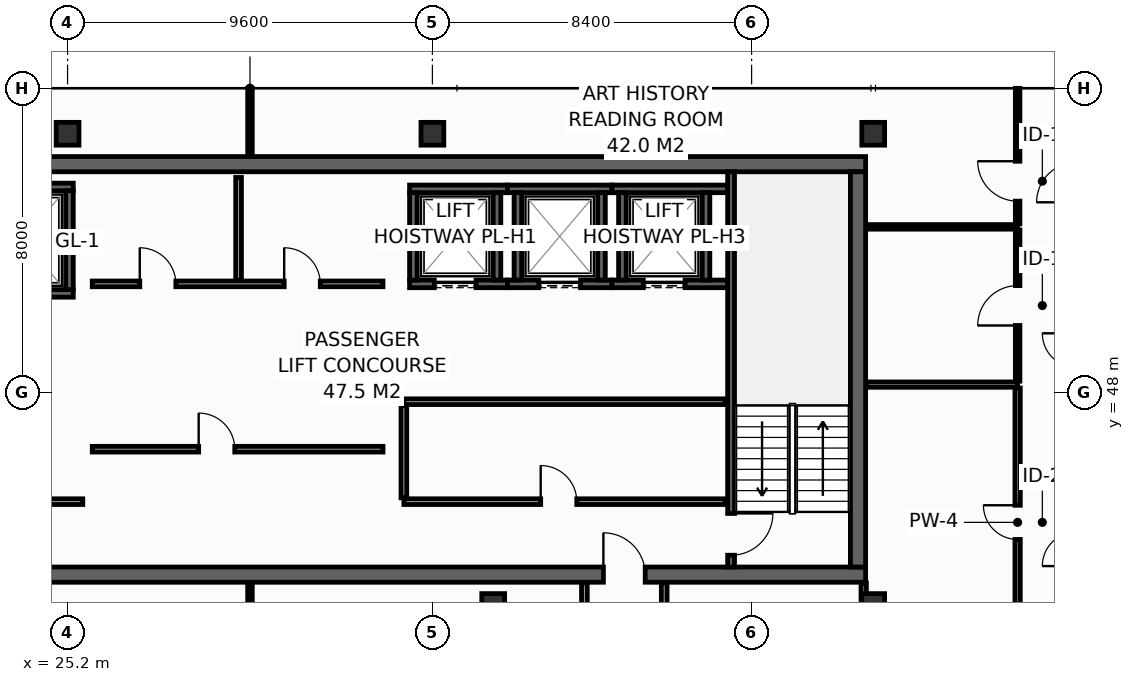
"""IFC4 building model, lengths in metres.
Left out: names, types, materials, properties, quantities, classifications, styles, units other than length and angle.
Written with IfcOpenShell. Run it as: python <this file> out.ifc"""

import sys

from ifc_helpers import new_model, si_unit, direction, frame, frame_2d, origin, origin_2d, place, context, subcontext, project, spatial, rectangle, hollow_rectangle, extrude, element, fill, save


model = new_model("IFC4")
c1 = context("Model", 3, precision=1e-05, world=origin(), true_north=direction((0.0, 1.0)))
c2 = subcontext(c1, "Body", "Model", "MODEL_VIEW")
j1 = project(units=[si_unit("LENGTHUNIT", "METRE"), si_unit("PLANEANGLEUNIT", "RADIAN")], contexts=[c1])
p1 = place(None, origin())
s1 = spatial("IfcSite", under=j1, at=p1, CompositionType="ELEMENT")
p2 = place(p1, origin())
s2 = spatial("IfcBuilding", under=s1, at=p2, CompositionType="ELEMENT")
p3 = place(p2, frame((0.0, 0.0, 276.2)))
s3 = spatial("IfcBuildingStorey", under=s2, at=p3, CompositionType="ELEMENT", Elevation=276.2)
p4 = place(p3, frame((13.7, 43.2, 0.0), z_axis=(0.0, 0.0, 1.0), x_axis=(1.0, 0.0, 0.0)))
e1 = element("IfcWall", 1, at=p4, inside=s3, PredefinedType="SHEAR", context=c2, shape_type="SweptSolid", body=[
    extrude(rectangle(XDim=32.5, YDim=0.4, at=frame_2d((16.25, 0.0))), origin(), (0.0, 0.0, 1.0), 3.55),
])
p5 = place(p4, frame((5.4, 0.0, 0.0)))
e2 = element("IfcOpeningElement", 2, at=p5, cuts=e1, PredefinedType="OPENING", context=c2, shape_type="SweptSolid", body=[
    extrude(rectangle(XDim=1.1, YDim=2.15, at=frame_2d((0.55, 1.075))), frame((0.0, 0.21, 0.0), z_axis=(0.0, -1.0, 0.0), x_axis=(1.0, 0.0, 0.0)), (0.0, 0.0, 1.0), 0.42),
])
p6 = place(p4, frame((25.6, 0.0, 0.0)))
e3 = element("IfcOpeningElement", 3, at=p6, cuts=e1, PredefinedType="OPENING", context=c2, shape_type="SweptSolid", body=[
    extrude(rectangle(XDim=1.1, YDim=2.15, at=frame_2d((0.55, 1.075))), frame((0.0, 0.21, 0.0), z_axis=(0.0, -1.0, 0.0), x_axis=(1.0, 0.0, 0.0)), (0.0, 0.0, 1.0), 0.42),
])
p7 = place(p3, frame((13.7, 54.0, 0.0), z_axis=(0.0, 0.0, 1.0), x_axis=(1.0, 0.0, 0.0)))
e4 = element("IfcWall", 4, at=p7, inside=s3, PredefinedType="SHEAR", context=c2, shape_type="SweptSolid", body=[
    extrude(rectangle(XDim=32.5, YDim=0.4, at=frame_2d((16.25, 0.0))), origin(), (0.0, 0.0, 1.0), 3.55),
])
p8 = place(p3, frame((46.0, 43.4, 0.0), z_axis=(0.0, 0.0, 1.0), x_axis=(0.0, 1.0, 0.0)))
e5 = element("IfcWall", 5, at=p8, inside=s3, PredefinedType="SHEAR", context=c2, shape_type="SweptSolid", body=[
    extrude(rectangle(XDim=10.4, YDim=0.4, at=frame_2d((5.2, 0.0))), origin(), (0.0, 0.0, 1.0), 3.55),
])
for number, where, z_axis, x_axis in (
    (6, (25.2, 54.8, 0.0), (0.0, 0.0, 1.0), (1.0, 0.0, 0.0)),
    (7, (34.8, 54.8, 0.0), (0.0, 0.0, 1.0), (1.0, 0.0, 0.0)),
    (8, (46.4, 54.8, 0.0), (0.0, 0.0, 1.0), (1.0, 0.0, 0.0)),
    (9, (36.4, 42.4, 0.0), (0.0, 0.0, 1.0), (1.0, 0.0, 0.0)),
    (10, (46.4, 42.4, 0.0), (0.0, 0.0, 1.0), (1.0, 0.0, 0.0)),
):
    element("IfcColumn", number, at=place(p3, frame(where, z_axis=z_axis, x_axis=x_axis)), inside=s3, PredefinedType="COLUMN", context=c2, shape_type="SweptSolid", body=[
        extrude(hollow_rectangle(XDim=0.6, YDim=0.6, WallThickness=0.028, at=origin_2d()), origin(), (0.0, 0.0, 1.0), 3.8),
    ])
p9 = place(p3, frame((22.5, 50.6, 0.0), z_axis=(0.0, 0.0, 1.0), x_axis=(1.0, 0.0, 0.0)))
e11 = element("IfcWall", 11, at=p9, inside=s3, PredefinedType="SHEAR", context=c2, shape_type="SweptSolid", body=[
    extrude(rectangle(XDim=2.85, YDim=0.2, at=frame_2d((1.425, 0.0))), origin(), (0.0, 0.0, 1.0), 3.55),
])
p10 = place(p9, frame((0.925, 0.0, 0.0)))
e12 = element("IfcOpeningElement", 12, at=p10, cuts=e11, PredefinedType="OPENING", context=c2, shape_type="SweptSolid", body=[
    extrude(rectangle(XDim=1.25, YDim=2.3, at=frame_2d((0.625, 1.15))), frame((0.0, 0.11, 0.0), z_axis=(0.0, -1.0, 0.0), x_axis=(1.0, 0.0, 0.0)), (0.0, 0.0, 1.0), 0.22),
])
p11 = place(p3, frame((22.5, 53.4, 0.0), z_axis=(0.0, 0.0, 1.0), x_axis=(1.0, 0.0, 0.0)))
e13 = element("IfcWall", 13, at=p11, inside=s3, PredefinedType="SHEAR", context=c2, shape_type="SweptSolid", body=[
    extrude(rectangle(XDim=2.85, YDim=0.2, at=frame_2d((1.425, 0.0))), origin(), (0.0, 0.0, 1.0), 3.55),
])
p12 = place(p3, frame((25.25, 50.7, 0.0), z_axis=(0.0, 0.0, 1.0), x_axis=(0.0, 1.0, 0.0)))
e14 = element("IfcWall", 14, at=p12, inside=s3, PredefinedType="SHEAR", context=c2, shape_type="SweptSolid", body=[
    extrude(rectangle(XDim=2.6, YDim=0.2, at=frame_2d((1.3, 0.0))), origin(), (0.0, 0.0, 1.0), 3.55),
])
p13 = place(p3, frame((34.2, 50.85, 0.0), z_axis=(0.0, 0.0, 1.0), x_axis=(1.0, 0.0, 0.0)))
e15 = element("IfcWall", 15, at=p13, inside=s3, PredefinedType="SHEAR", context=c2, shape_type="SweptSolid", body=[
    extrude(rectangle(XDim=2.575, YDim=0.2, at=frame_2d((1.288, 0.0))), origin(), (0.0, 0.0, 1.0), 3.55),
])
p14 = place(p13, frame((0.65, 0.0, 0.0)))
e16 = element("IfcOpeningElement", 16, at=p14, cuts=e15, PredefinedType="OPENING", context=c2, shape_type="SweptSolid", body=[
    extrude(rectangle(XDim=1.1, YDim=2.2, at=frame_2d((0.55, 1.1))), frame((0.0, 0.11, 0.0), z_axis=(0.0, -1.0, 0.0), x_axis=(1.0, 0.0, 0.0)), (0.0, 0.0, 1.0), 0.22),
])
p15 = place(p3, frame((34.2, 53.35, 0.0), z_axis=(0.0, 0.0, 1.0), x_axis=(1.0, 0.0, 0.0)))
e17 = element("IfcWall", 17, at=p15, inside=s3, PredefinedType="SHEAR", context=c2, shape_type="SweptSolid", body=[
    extrude(rectangle(XDim=2.575, YDim=0.2, at=frame_2d((1.288, 0.0))), origin(), (0.0, 0.0, 1.0), 3.55),
])
for number, where, z_axis, x_axis in (
    (18, (34.3, 50.95, 0.0), (0.0, 0.0, 1.0), (0.0, 1.0, 0.0)),
    (19, (36.5, 50.95, 0.0), (0.0, 0.0, 1.0), (0.0, 1.0, 0.0)),
):
    element("IfcWall", number, at=place(p3, frame(where, z_axis=z_axis, x_axis=x_axis)), inside=s3, PredefinedType="SHEAR", context=c2, shape_type="SweptSolid", body=[
        extrude(rectangle(XDim=2.3, YDim=0.2, at=frame_2d((1.15, 0.0))), origin(), (0.0, 0.0, 1.0), 3.55),
    ])
p16 = place(p3, frame((36.775, 50.85, 0.0), z_axis=(0.0, 0.0, 1.0), x_axis=(1.0, 0.0, 0.0)))
e20 = element("IfcWall", 20, at=p16, inside=s3, PredefinedType="SHEAR", context=c2, shape_type="SweptSolid", body=[
    extrude(rectangle(XDim=2.75, YDim=0.2, at=frame_2d((1.375, 0.0))), origin(), (0.0, 0.0, 1.0), 3.55),
])
p17 = place(p16, frame((0.825, 0.0, 0.0)))
e21 = element("IfcOpeningElement", 21, at=p17, cuts=e20, PredefinedType="OPENING", context=c2, shape_type="SweptSolid", body=[
    extrude(rectangle(XDim=1.1, YDim=2.2, at=frame_2d((0.55, 1.1))), frame((0.0, 0.11, 0.0), z_axis=(0.0, -1.0, 0.0), x_axis=(1.0, 0.0, 0.0)), (0.0, 0.0, 1.0), 0.22),
])
p18 = place(p3, frame((36.775, 53.35, 0.0), z_axis=(0.0, 0.0, 1.0), x_axis=(1.0, 0.0, 0.0)))
e22 = element("IfcWall", 22, at=p18, inside=s3, PredefinedType="SHEAR", context=c2, shape_type="SweptSolid", body=[
    extrude(rectangle(XDim=2.75, YDim=0.2, at=frame_2d((1.375, 0.0))), origin(), (0.0, 0.0, 1.0), 3.55),
])
for number, where, z_axis, x_axis in (
    (23, (37.05, 50.95, 0.0), (0.0, 0.0, 1.0), (0.0, 1.0, 0.0)),
    (24, (39.25, 50.95, 0.0), (0.0, 0.0, 1.0), (0.0, 1.0, 0.0)),
):
    element("IfcWall", number, at=place(p3, frame(where, z_axis=z_axis, x_axis=x_axis)), inside=s3, PredefinedType="SHEAR", context=c2, shape_type="SweptSolid", body=[
        extrude(rectangle(XDim=2.3, YDim=0.2, at=frame_2d((1.15, 0.0))), origin(), (0.0, 0.0, 1.0), 3.55),
    ])
p19 = place(p3, frame((39.525, 50.85, 0.0), z_axis=(0.0, 0.0, 1.0), x_axis=(1.0, 0.0, 0.0)))
e25 = element("IfcWall", 25, at=p19, inside=s3, PredefinedType="SHEAR", context=c2, shape_type="SweptSolid", body=[
    extrude(rectangle(XDim=3.045, YDim=0.2, at=frame_2d((1.522, 0.0))), origin(), (0.0, 0.0, 1.0), 3.55),
])
p20 = place(p19, frame((0.825, 0.0, 0.0)))
e26 = element("IfcOpeningElement", 26, at=p20, cuts=e25, PredefinedType="OPENING", context=c2, shape_type="SweptSolid", body=[
    extrude(rectangle(XDim=1.1, YDim=2.2, at=frame_2d((0.55, 1.1))), frame((0.0, 0.11, 0.0), z_axis=(0.0, -1.0, 0.0), x_axis=(1.0, 0.0, 0.0)), (0.0, 0.0, 1.0), 0.22),
])
p21 = place(p3, frame((39.525, 53.35, 0.0), z_axis=(0.0, 0.0, 1.0), x_axis=(1.0, 0.0, 0.0)))
e27 = element("IfcWall", 27, at=p21, inside=s3, PredefinedType="SHEAR", context=c2, shape_type="SweptSolid", body=[
    extrude(rectangle(XDim=3.045, YDim=0.2, at=frame_2d((1.522, 0.0))), origin(), (0.0, 0.0, 1.0), 3.55),
])
for number, where, z_axis, x_axis in (
    (28, (39.8, 50.95, 0.0), (0.0, 0.0, 1.0), (0.0, 1.0, 0.0)),
    (29, (42.0, 50.95, 0.0), (0.0, 0.0, 1.0), (0.0, 1.0, 0.0)),
):
    element("IfcWall", number, at=place(p3, frame(where, z_axis=z_axis, x_axis=x_axis)), inside=s3, PredefinedType="SHEAR", context=c2, shape_type="SweptSolid", body=[
        extrude(rectangle(XDim=2.3, YDim=0.2, at=frame_2d((1.15, 0.0))), origin(), (0.0, 0.0, 1.0), 3.55),
    ])
p22 = place(p3, frame((42.66, 53.8, 0.0), z_axis=(0.0, 0.0, 1.0), x_axis=(0.0, -1.0, 0.0)))
e30 = element("IfcWall", 30, at=p22, inside=s3, PredefinedType="SHEAR", context=c2, shape_type="SweptSolid", body=[
    extrude(rectangle(XDim=10.4, YDim=0.18, at=frame_2d((5.2, 0.0))), origin(), (0.0, 0.0, 1.0), 3.55),
])
p23 = place(p22, frame((8.99, 0.0, 0.0)))
e31 = element("IfcOpeningElement", 31, at=p23, cuts=e30, PredefinedType="OPENING", context=c2, shape_type="SweptSolid", body=[
    extrude(rectangle(XDim=1.1, YDim=2.15, at=frame_2d((0.55, 1.075))), frame((0.0, 0.1, 0.0), z_axis=(0.0, -1.0, 0.0), x_axis=(1.0, 0.0, 0.0)), (0.0, 0.0, 1.0), 0.2),
])
p24 = place(p3, frame((22.68, 45.12, 0.0), z_axis=(0.0, 0.0, 1.0), x_axis=(1.0, 0.0, 0.0)))
e32 = element("IfcWall", 32, at=p24, inside=s3, PredefinedType="PARTITIONING", context=c2, shape_type="SweptSolid", body=[
    extrude(rectangle(XDim=2.92, YDim=0.15, at=frame_2d((1.46, 0.0))), origin(), (0.0, 0.0, 1.0), 3.55),
])
p25 = place(p24, frame((0.85, 0.0, 0.0)))
e33 = element("IfcOpeningElement", 33, at=p25, cuts=e32, PredefinedType="OPENING", context=c2, shape_type="SweptSolid", body=[
    extrude(rectangle(XDim=1.1, YDim=2.15, at=frame_2d((0.55, 1.075))), frame((0.0, 0.085, 0.0), z_axis=(0.0, -1.0, 0.0), x_axis=(1.0, 0.0, 0.0)), (0.0, 0.0, 1.0), 0.17),
])
p26 = place(p3, frame((34.05, 45.12, 0.0), z_axis=(0.0, 0.0, 1.0), x_axis=(1.0, 0.0, 0.0)))
e34 = element("IfcWall", 34, at=p26, inside=s3, PredefinedType="PARTITIONING", context=c2, shape_type="SweptSolid", body=[
    extrude(rectangle(XDim=8.45, YDim=0.15, at=frame_2d((4.225, 0.0))), origin(), (0.0, 0.0, 1.0), 3.55),
])
p27 = place(p26, frame((3.6, 0.0, 0.0)))
e35 = element("IfcOpeningElement", 35, at=p27, cuts=e34, PredefinedType="OPENING", context=c2, shape_type="SweptSolid", body=[
    extrude(rectangle(XDim=0.95, YDim=2.15, at=frame_2d((0.475, 1.075))), frame((0.0, 0.085, 0.0), z_axis=(0.0, -1.0, 0.0), x_axis=(1.0, 0.0, 0.0)), (0.0, 0.0, 1.0), 0.17),
])
p28 = place(p3, frame((34.05, 47.75, 0.0), z_axis=(0.0, 0.0, 1.0), x_axis=(1.0, 0.0, 0.0)))
e36 = element("IfcWall", 36, at=p28, inside=s3, PredefinedType="PARTITIONING", context=c2, shape_type="SweptSolid", body=[
    extrude(rectangle(XDim=8.45, YDim=0.15, at=frame_2d((4.225, 0.0))), origin(), (0.0, 0.0, 1.0), 3.55),
])
p29 = place(p3, frame((34.05, 45.22, 0.0), z_axis=(0.0, 0.0, 1.0), x_axis=(0.0, 1.0, 0.0)))
e37 = element("IfcWall", 37, at=p29, inside=s3, PredefinedType="PARTITIONING", context=c2, shape_type="SweptSolid", body=[
    extrude(rectangle(XDim=2.43, YDim=0.15, at=frame_2d((1.215, 0.0))), origin(), (0.0, 0.0, 1.0), 3.55),
])
p30 = place(p3, frame((25.85, 50.85, 0.0), z_axis=(0.0, 0.0, 1.0), x_axis=(1.0, 0.0, 0.0)))
e38 = element("IfcWall", 38, at=p30, inside=s3, PredefinedType="PARTITIONING", context=c2, shape_type="SweptSolid", body=[
    extrude(rectangle(XDim=7.65, YDim=0.15, at=frame_2d((3.825, 0.0))), origin(), (0.0, 0.0, 1.0), 3.55),
])
p31 = place(p30, frame((1.25, 0.0, 0.0)))
e39 = element("IfcOpeningElement", 39, at=p31, cuts=e38, PredefinedType="OPENING", context=c2, shape_type="SweptSolid", body=[
    extrude(rectangle(XDim=0.95, YDim=2.15, at=frame_2d((0.475, 1.075))), frame((0.0, 0.085, 0.0), z_axis=(0.0, -1.0, 0.0), x_axis=(1.0, 0.0, 0.0)), (0.0, 0.0, 1.0), 0.17),
])
p32 = place(p30, frame((5.05, 0.0, 0.0)))
e40 = element("IfcOpeningElement", 40, at=p32, cuts=e38, PredefinedType="OPENING", context=c2, shape_type="SweptSolid", body=[
    extrude(rectangle(XDim=0.95, YDim=2.15, at=frame_2d((0.475, 1.075))), frame((0.0, 0.085, 0.0), z_axis=(0.0, -1.0, 0.0), x_axis=(1.0, 0.0, 0.0)), (0.0, 0.0, 1.0), 0.17),
])
p33 = place(p3, frame((29.7, 50.95, 0.0), z_axis=(0.0, 0.0, 1.0), x_axis=(0.0, 1.0, 0.0)))
e41 = element("IfcWall", 41, at=p33, inside=s3, PredefinedType="PARTITIONING", context=c2, shape_type="SweptSolid", body=[
    extrude(rectangle(XDim=2.7, YDim=0.15, at=frame_2d((1.35, 0.0))), origin(), (0.0, 0.0, 1.0), 3.55),
])
p34 = place(p3, frame((25.85, 46.5, 0.0), z_axis=(0.0, 0.0, 1.0), x_axis=(1.0, 0.0, 0.0)))
e42 = element("IfcWall", 42, at=p34, inside=s3, PredefinedType="PARTITIONING", context=c2, shape_type="SweptSolid", body=[
    extrude(rectangle(XDim=7.65, YDim=0.15, at=frame_2d((3.825, 0.0))), origin(), (0.0, 0.0, 1.0), 3.55),
])
p35 = place(p34, frame((2.8, 0.0, 0.0)))
e43 = element("IfcOpeningElement", 43, at=p35, cuts=e42, PredefinedType="OPENING", context=c2, shape_type="SweptSolid", body=[
    extrude(rectangle(XDim=0.95, YDim=2.15, at=frame_2d((0.475, 1.075))), frame((0.0, 0.085, 0.0), z_axis=(0.0, -1.0, 0.0), x_axis=(1.0, 0.0, 0.0)), (0.0, 0.0, 1.0), 0.17),
])
p36 = place(p3, frame((46.15, 41.04, 0.0), z_axis=(0.0, 0.0, 1.0), x_axis=(0.0, 1.0, 0.0)))
e44 = element("IfcWall", 44, at=p36, inside=s3, PredefinedType="PARTITIONING", context=c2, shape_type="SweptSolid", body=[
    extrude(rectangle(XDim=1.94, YDim=0.14, at=frame_2d((0.97, 0.0))), origin(), (0.0, 0.0, 1.0), 3.55),
])
p37 = place(p3, frame((46.22, 48.2, 0.0), z_axis=(0.0, 0.0, 1.0), x_axis=(1.0, 0.0, 0.0)))
e45 = element("IfcWall", 45, at=p37, inside=s3, PredefinedType="PARTITIONING", context=c2, shape_type="SweptSolid", body=[
    extrude(rectangle(XDim=3.98, YDim=0.14, at=frame_2d((1.99, 0.0))), origin(), (0.0, 0.0, 1.0), 3.55),
])
p38 = place(p3, frame((50.2, 41.04, 0.0), z_axis=(0.0, 0.0, 1.0), x_axis=(0.0, 1.0, 0.0)))
e46 = element("IfcWall", 46, at=p38, inside=s3, PredefinedType="PARTITIONING", context=c2, shape_type="SweptSolid", body=[
    extrude(rectangle(XDim=7.07, YDim=0.14, at=frame_2d((3.535, 0.0))), origin(), (0.0, 0.0, 1.0), 2.947),
])
p39 = place(p38, frame((3.085, 0.0, 0.0)))
e47 = element("IfcOpeningElement", 47, at=p39, cuts=e46, PredefinedType="OPENING", context=c2, shape_type="SweptSolid", body=[
    extrude(rectangle(XDim=0.9, YDim=2.1, at=frame_2d((0.45, 1.05))), frame((0.0, 0.08, 0.0), z_axis=(0.0, -1.0, 0.0), x_axis=(1.0, 0.0, 0.0)), (0.0, 0.0, 1.0), 0.16),
])
p40 = place(p3, frame((46.22, 52.35, 0.0), z_axis=(0.0, 0.0, 1.0), x_axis=(1.0, 0.0, 0.0)))
e48 = element("IfcWall", 48, at=p40, inside=s3, PredefinedType="PARTITIONING", context=c2, shape_type="SweptSolid", body=[
    extrude(rectangle(XDim=3.98, YDim=0.12, at=frame_2d((1.99, 0.0))), origin(), (0.0, 0.0, 1.0), 3.55),
])
p41 = place(p3, frame((30.0, 54.22, 0.0), z_axis=(0.0, 0.0, 1.0), x_axis=(0.0, 1.0, 0.0)))
e49 = element("IfcWall", 49, at=p41, inside=s3, PredefinedType="PARTITIONING", context=c2, shape_type="SweptSolid", body=[
    extrude(rectangle(XDim=1.775, YDim=0.12, at=frame_2d((0.888, 0.0))), origin(), (0.0, 0.0, 1.0), 2.935),
])
p42 = place(p3, frame((50.2, 48.29, 0.0), z_axis=(0.0, 0.0, 1.0), x_axis=(0.0, 1.0, 0.0)))
e50 = element("IfcWall", 50, at=p42, inside=s3, PredefinedType="PARTITIONING", context=c2, shape_type="SweptSolid", body=[
    extrude(rectangle(XDim=3.98, YDim=0.12, at=frame_2d((1.99, 0.0))), origin(), (0.0, 0.0, 1.0), 3.55),
])
p43 = place(p42, frame((1.465, 0.0, 0.0)))
e51 = element("IfcOpeningElement", 51, at=p43, cuts=e50, PredefinedType="OPENING", context=c2, shape_type="SweptSolid", body=[
    extrude(rectangle(XDim=1.05, YDim=2.15, at=frame_2d((0.525, 1.075))), frame((0.0, 0.07, 0.0), z_axis=(0.0, -1.0, 0.0), x_axis=(1.0, 0.0, 0.0)), (0.0, 0.0, 1.0), 0.14),
])
p44 = place(p3, frame((50.2, 52.43, 0.0), z_axis=(0.0, 0.0, 1.0), x_axis=(0.0, 1.0, 0.0)))
e52 = element("IfcWall", 52, at=p44, inside=s3, PredefinedType="PARTITIONING", context=c2, shape_type="SweptSolid", body=[
    extrude(rectangle(XDim=3.565, YDim=0.12, at=frame_2d((1.783, 0.0))), origin(), (0.0, 0.0, 1.0), 2.935),
])
p45 = place(p44, frame((0.597, 0.0, 0.0)))
e53 = element("IfcOpeningElement", 53, at=p45, cuts=e52, PredefinedType="OPENING", context=c2, shape_type="SweptSolid", body=[
    extrude(rectangle(XDim=1.05, YDim=2.15, at=frame_2d((0.525, 1.075))), frame((0.0, 0.07, 0.0), z_axis=(0.0, -1.0, 0.0), x_axis=(1.0, 0.0, 0.0)), (0.0, 0.0, 1.0), 0.14),
])
for number, where, z_axis, x_axis in (
    (54, (38.8, 40.95, 0.0), (0.0, 0.0, 1.0), (0.0, 1.0, 0.0)),
    (55, (40.9, 40.95, 0.0), (0.0, 0.0, 1.0), (0.0, 1.0, 0.0)),
):
    element("IfcWall", number, at=place(p3, frame(where, z_axis=z_axis, x_axis=x_axis)), inside=s3, PredefinedType="PARTITIONING", context=c2, shape_type="SweptSolid", body=[
        extrude(rectangle(XDim=2.03, YDim=0.15, at=frame_2d((1.015, 0.0))), origin(), (0.0, 0.0, 1.0), 3.55),
    ])
p46 = place(p3, frame((30.0, 40.95, 0.0), z_axis=(0.0, 0.0, 1.0), x_axis=(0.0, 1.0, 0.0)))
e56 = element("IfcWall", 56, at=p46, inside=s3, PredefinedType="PARTITIONING", context=c2, shape_type="SweptSolid", body=[
    extrude(rectangle(XDim=2.03, YDim=0.12, at=frame_2d((1.015, 0.0))), origin(), (0.0, 0.0, 1.0), 2.947),
])
p47 = place(p14, origin())
e57 = element("IfcDoor", 57, at=p47, inside=s3, OperationType="SLIDING_TO_LEFT", PredefinedType="DOOR", context=c2, shape_type="SweptSolid", body=[
    extrude(rectangle(XDim=1.1, YDim=2.2, at=frame_2d((0.55, 1.1))), frame((0.0, 0.025, 0.0), z_axis=(0.0, -1.0, 0.0), x_axis=(1.0, 0.0, 0.0)), (0.0, 0.0, 1.0), 0.05),
])
fill(e16, e57)
p48 = place(p17, origin())
e58 = element("IfcDoor", 58, at=p48, inside=s3, OperationType="SLIDING_TO_LEFT", PredefinedType="DOOR", context=c2, shape_type="SweptSolid", body=[
    extrude(rectangle(XDim=1.1, YDim=2.2, at=frame_2d((0.55, 1.1))), frame((0.0, 0.025, 0.0), z_axis=(0.0, -1.0, 0.0), x_axis=(1.0, 0.0, 0.0)), (0.0, 0.0, 1.0), 0.05),
])
fill(e21, e58)
p49 = place(p20, origin())
e59 = element("IfcDoor", 59, at=p49, inside=s3, OperationType="SLIDING_TO_LEFT", PredefinedType="DOOR", context=c2, shape_type="SweptSolid", body=[
    extrude(rectangle(XDim=1.1, YDim=2.2, at=frame_2d((0.55, 1.1))), frame((0.0, 0.025, 0.0), z_axis=(0.0, -1.0, 0.0), x_axis=(1.0, 0.0, 0.0)), (0.0, 0.0, 1.0), 0.05),
])
fill(e26, e59)
p50 = place(p23, origin())
e60 = element("IfcDoor", 60, at=p50, inside=s3, OperationType="SINGLE_SWING_LEFT", PredefinedType="DOOR", context=c2, shape_type="SweptSolid", body=[
    extrude(rectangle(XDim=1.1, YDim=2.15, at=frame_2d((0.55, 1.075))), frame((0.0, 0.025, 0.0), z_axis=(0.0, -1.0, 0.0), x_axis=(1.0, 0.0, 0.0)), (0.0, 0.0, 1.0), 0.05),
])
fill(e31, e60)
p51 = place(p6, origin())
e61 = element("IfcDoor", 61, at=p51, inside=s3, OperationType="SINGLE_SWING_LEFT", PredefinedType="DOOR", context=c2, shape_type="SweptSolid", body=[
    extrude(rectangle(XDim=1.1, YDim=2.15, at=frame_2d((0.55, 1.075))), frame((0.0, 0.025, 0.0), z_axis=(0.0, -1.0, 0.0), x_axis=(1.0, 0.0, 0.0)), (0.0, 0.0, 1.0), 0.05),
])
fill(e3, e61)
p52 = place(p27, origin())
e62 = element("IfcDoor", 62, at=p52, inside=s3, OperationType="SINGLE_SWING_LEFT", PredefinedType="DOOR", context=c2, shape_type="SweptSolid", body=[
    extrude(rectangle(XDim=0.95, YDim=2.15, at=frame_2d((0.475, 1.075))), frame((0.0, 0.025, 0.0), z_axis=(0.0, -1.0, 0.0), x_axis=(1.0, 0.0, 0.0)), (0.0, 0.0, 1.0), 0.05),
])
fill(e35, e62)
p53 = place(p31, origin())
e63 = element("IfcDoor", 63, at=p53, inside=s3, OperationType="SINGLE_SWING_LEFT", PredefinedType="DOOR", context=c2, shape_type="SweptSolid", body=[
    extrude(rectangle(XDim=0.95, YDim=2.15, at=frame_2d((0.475, 1.075))), frame((0.0, 0.025, 0.0), z_axis=(0.0, -1.0, 0.0), x_axis=(1.0, 0.0, 0.0)), (0.0, 0.0, 1.0), 0.05),
])
fill(e39, e63)
p54 = place(p32, origin())
e64 = element("IfcDoor", 64, at=p54, inside=s3, OperationType="SINGLE_SWING_LEFT", PredefinedType="DOOR", context=c2, shape_type="SweptSolid", body=[
    extrude(rectangle(XDim=0.95, YDim=2.15, at=frame_2d((0.475, 1.075))), frame((0.0, 0.025, 0.0), z_axis=(0.0, -1.0, 0.0), x_axis=(1.0, 0.0, 0.0)), (0.0, 0.0, 1.0), 0.05),
])
fill(e40, e64)
p55 = place(p35, origin())
e65 = element("IfcDoor", 65, at=p55, inside=s3, OperationType="SINGLE_SWING_LEFT", PredefinedType="DOOR", context=c2, shape_type="SweptSolid", body=[
    extrude(rectangle(XDim=0.95, YDim=2.15, at=frame_2d((0.475, 1.075))), frame((0.0, 0.025, 0.0), z_axis=(0.0, -1.0, 0.0), x_axis=(1.0, 0.0, 0.0)), (0.0, 0.0, 1.0), 0.05),
])
fill(e43, e65)
p56 = place(p39, origin())
e66 = element("IfcDoor", 66, at=p56, inside=s3, OperationType="SINGLE_SWING_RIGHT", PredefinedType="DOOR", context=c2, shape_type="SweptSolid", body=[
    extrude(rectangle(XDim=0.9, YDim=2.1, at=frame_2d((0.45, 1.05))), frame((0.0, 0.025, 0.0), z_axis=(0.0, -1.0, 0.0), x_axis=(1.0, 0.0, 0.0)), (0.0, 0.0, 1.0), 0.05),
])
fill(e47, e66)
p57 = place(p43, origin())
e67 = element("IfcDoor", 67, at=p57, inside=s3, OperationType="SINGLE_SWING_LEFT", PredefinedType="DOOR", context=c2, shape_type="SweptSolid", body=[
    extrude(rectangle(XDim=1.05, YDim=2.15, at=frame_2d((0.525, 1.075))), frame((0.0, 0.025, 0.0), z_axis=(0.0, -1.0, 0.0), x_axis=(1.0, 0.0, 0.0)), (0.0, 0.0, 1.0), 0.05),
])
fill(e51, e67)
p58 = place(p45, origin())
e68 = element("IfcDoor", 68, at=p58, inside=s3, OperationType="SINGLE_SWING_RIGHT", PredefinedType="DOOR", context=c2, shape_type="SweptSolid", body=[
    extrude(rectangle(XDim=1.05, YDim=2.15, at=frame_2d((0.525, 1.075))), frame((0.0, 0.025, 0.0), z_axis=(0.0, -1.0, 0.0), x_axis=(1.0, 0.0, 0.0)), (0.0, 0.0, 1.0), 0.05),
])
fill(e53, e68)
save(model, sys.argv[1])
